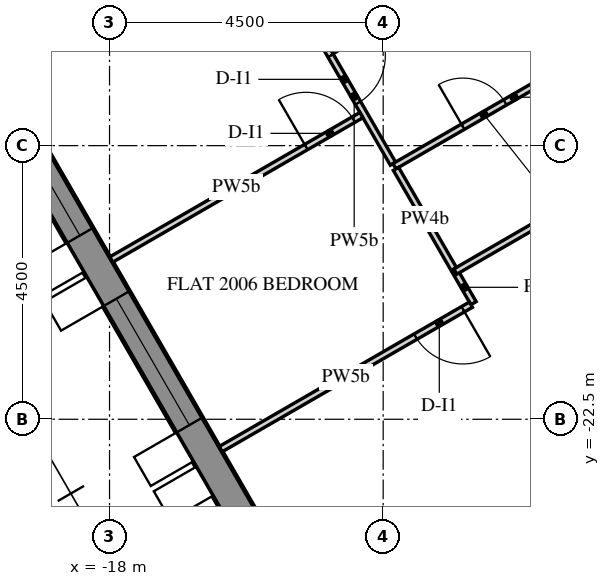
"""IFC4 building model, lengths in metres.
Left out: names, types, materials, properties, quantities, classifications, styles, units other than length and angle.
Written with IfcOpenShell. Run it as: python <this file> out.ifc"""

import sys

from ifc_helpers import new_model, si_unit, direction, frame, frame_2d, origin, place, context, subcontext, project, spatial, polyline, rectangle, outline, extrude, element, fill, save


model = new_model("IFC4")
c1 = context("Model", 3, precision=1e-05, world=origin(), true_north=direction((0.0, 1.0)))
c2 = subcontext(c1, "Body", "Model", "MODEL_VIEW")
j1 = project(units=[si_unit("LENGTHUNIT", "METRE"), si_unit("PLANEANGLEUNIT", "RADIAN")], contexts=[c1])
p1 = place(None, origin())
s1 = spatial("IfcSite", under=j1, at=p1, CompositionType="ELEMENT")
p2 = place(p1, origin())
s2 = spatial("IfcBuilding", under=s1, at=p2, CompositionType="ELEMENT")
p3 = place(p2, frame((0.0, 0.0, 256.2)))
s3 = spatial("IfcBuildingStorey", under=s2, at=p3, CompositionType="ELEMENT", Elevation=256.2)
p4 = place(p3, frame((-28.149, -2.745, 0.0), z_axis=(0.0, 0.0, 1.0), x_axis=(0.500003737743, -0.866023245787, 0.0)))
e1 = element("IfcWall", 1, at=p4, inside=s3, PredefinedType="SOLIDWALL", context=c2, shape_type="SweptSolid", body=[
    extrude(outline(polyline([(-0.021, -0.25), (25.468, -0.25), (25.421, 0.25), (0.021, 0.25), (-0.021, -0.25)])), origin(), (0.0, 0.0, 1.0), 3.75),
])
p5 = place(p4, frame((2.522, 0.0, 0.6)))
e2 = element("IfcOpeningElement", 2, at=p5, cuts=e1, PredefinedType="OPENING", context=c2, shape_type="SweptSolid", body=[
    extrude(rectangle(XDim=2.4, YDim=2.7, at=frame_2d((1.2, 1.35))), frame((0.0, 0.26, 0.0), z_axis=(0.0, -1.0, 0.0), x_axis=(1.0, 0.0, 0.0)), (0.0, 0.0, 1.0), 0.52),
])
p6 = place(p4, frame((6.122, 0.0, 0.6)))
e3 = element("IfcOpeningElement", 3, at=p6, cuts=e1, PredefinedType="OPENING", context=c2, shape_type="SweptSolid", body=[
    extrude(rectangle(XDim=2.4, YDim=2.7, at=frame_2d((1.2, 1.35))), frame((0.0, 0.26, 0.0), z_axis=(0.0, -1.0, 0.0), x_axis=(1.0, 0.0, 0.0)), (0.0, 0.0, 1.0), 0.52),
])
p7 = place(p4, frame((9.722, 0.0, 0.6)))
e4 = element("IfcOpeningElement", 4, at=p7, cuts=e1, PredefinedType="OPENING", context=c2, shape_type="SweptSolid", body=[
    extrude(rectangle(XDim=2.4, YDim=2.7, at=frame_2d((1.2, 1.35))), frame((0.0, 0.26, 0.0), z_axis=(0.0, -1.0, 0.0), x_axis=(1.0, 0.0, 0.0)), (0.0, 0.0, 1.0), 0.52),
])
p8 = place(p4, frame((13.323, 0.0, 0.6)))
e5 = element("IfcOpeningElement", 5, at=p8, cuts=e1, PredefinedType="OPENING", context=c2, shape_type="SweptSolid", body=[
    extrude(rectangle(XDim=2.4, YDim=2.7, at=frame_2d((1.2, 1.35))), frame((0.0, 0.26, 0.0), z_axis=(0.0, -1.0, 0.0), x_axis=(1.0, 0.0, 0.0)), (0.0, 0.0, 1.0), 0.52),
])
p9 = place(p4, frame((16.922, 0.0, 0.6)))
e6 = element("IfcOpeningElement", 6, at=p9, cuts=e1, PredefinedType="OPENING", context=c2, shape_type="SweptSolid", body=[
    extrude(rectangle(XDim=2.4, YDim=2.7, at=frame_2d((1.2, 1.35))), frame((0.0, 0.26, 0.0), z_axis=(0.0, -1.0, 0.0), x_axis=(1.0, 0.0, 0.0)), (0.0, 0.0, 1.0), 0.52),
])
p10 = place(p4, frame((20.522, 0.0, 0.6)))
e7 = element("IfcOpeningElement", 7, at=p10, cuts=e1, PredefinedType="OPENING", context=c2, shape_type="SweptSolid", body=[
    extrude(rectangle(XDim=2.4, YDim=2.7, at=frame_2d((1.2, 1.35))), frame((0.0, 0.26, 0.0), z_axis=(0.0, -1.0, 0.0), x_axis=(1.0, 0.0, 0.0)), (0.0, 0.0, 1.0), 0.52),
])
p11 = place(p3, frame((-10.86, -24.567, 0.0), z_axis=(0.0, 0.0, 1.0), x_axis=(0.997564329317, 0.06975248292, 0.0)))
e8 = element("IfcWall", 8, at=p11, inside=s3, PredefinedType="SOLIDWALL", context=c2, shape_type="SweptSolid", body=[
    extrude(outline(polyline([(0.25, -0.25), (22.795, -0.25), (23.295, 0.25), (-0.25, 0.25), (0.25, -0.25)])), origin(), (0.0, 0.0, 1.0), 3.75),
])
p12 = place(p11, frame((1.323, 0.0, 0.9)))
e9 = element("IfcOpeningElement", 9, at=p12, cuts=e8, PredefinedType="OPENING", context=c2, shape_type="SweptSolid", body=[
    extrude(rectangle(XDim=0.9, YDim=1.5, at=frame_2d((0.45, 0.75))), frame((0.0, 0.26, 0.0), z_axis=(0.0, -1.0, 0.0), x_axis=(1.0, 0.0, 0.0)), (0.0, 0.0, 1.0), 0.52),
])
p13 = place(p11, frame((2.522, 0.0, 0.0)))
e10 = element("IfcOpeningElement", 10, at=p13, cuts=e8, PredefinedType="OPENING", context=c2, shape_type="SweptSolid", body=[
    extrude(rectangle(XDim=1.2, YDim=2.4, at=frame_2d((0.6, 1.2))), frame((0.0, 0.26, 0.0), z_axis=(0.0, -1.0, 0.0), x_axis=(1.0, 0.0, 0.0)), (0.0, 0.0, 1.0), 0.52),
])
p14 = place(p11, frame((4.922, 0.0, 0.9)))
e11 = element("IfcOpeningElement", 11, at=p14, cuts=e8, PredefinedType="OPENING", context=c2, shape_type="SweptSolid", body=[
    extrude(rectangle(XDim=0.9, YDim=1.5, at=frame_2d((0.45, 0.75))), frame((0.0, 0.26, 0.0), z_axis=(0.0, -1.0, 0.0), x_axis=(1.0, 0.0, 0.0)), (0.0, 0.0, 1.0), 0.52),
])
p15 = place(p11, frame((6.122, 0.0, 0.0)))
e12 = element("IfcOpeningElement", 12, at=p15, cuts=e8, PredefinedType="OPENING", context=c2, shape_type="SweptSolid", body=[
    extrude(rectangle(XDim=1.2, YDim=2.4, at=frame_2d((0.6, 1.2))), frame((0.0, 0.26, 0.0), z_axis=(0.0, -1.0, 0.0), x_axis=(1.0, 0.0, 0.0)), (0.0, 0.0, 1.0), 0.52),
])
p16 = place(p11, frame((8.522, 0.0, 0.9)))
e13 = element("IfcOpeningElement", 13, at=p16, cuts=e8, PredefinedType="OPENING", context=c2, shape_type="SweptSolid", body=[
    extrude(rectangle(XDim=0.9, YDim=1.5, at=frame_2d((0.45, 0.75))), frame((0.0, 0.26, 0.0), z_axis=(0.0, -1.0, 0.0), x_axis=(1.0, 0.0, 0.0)), (0.0, 0.0, 1.0), 0.52),
])
p17 = place(p11, frame((9.722, 0.0, 0.0)))
e14 = element("IfcOpeningElement", 14, at=p17, cuts=e8, PredefinedType="OPENING", context=c2, shape_type="SweptSolid", body=[
    extrude(rectangle(XDim=1.2, YDim=2.4, at=frame_2d((0.6, 1.2))), frame((0.0, 0.26, 0.0), z_axis=(0.0, -1.0, 0.0), x_axis=(1.0, 0.0, 0.0)), (0.0, 0.0, 1.0), 0.52),
])
p18 = place(p11, frame((12.122, 0.0, 0.9)))
e15 = element("IfcOpeningElement", 15, at=p18, cuts=e8, PredefinedType="OPENING", context=c2, shape_type="SweptSolid", body=[
    extrude(rectangle(XDim=0.9, YDim=1.5, at=frame_2d((0.45, 0.75))), frame((0.0, 0.26, 0.0), z_axis=(0.0, -1.0, 0.0), x_axis=(1.0, 0.0, 0.0)), (0.0, 0.0, 1.0), 0.52),
])
p19 = place(p11, frame((13.323, 0.0, 0.0)))
e16 = element("IfcOpeningElement", 16, at=p19, cuts=e8, PredefinedType="OPENING", context=c2, shape_type="SweptSolid", body=[
    extrude(rectangle(XDim=1.2, YDim=2.4, at=frame_2d((0.6, 1.2))), frame((0.0, 0.26, 0.0), z_axis=(0.0, -1.0, 0.0), x_axis=(1.0, 0.0, 0.0)), (0.0, 0.0, 1.0), 0.52),
])
p20 = place(p11, frame((15.722, 0.0, 0.9)))
e17 = element("IfcOpeningElement", 17, at=p20, cuts=e8, PredefinedType="OPENING", context=c2, shape_type="SweptSolid", body=[
    extrude(rectangle(XDim=0.9, YDim=1.5, at=frame_2d((0.45, 0.75))), frame((0.0, 0.26, 0.0), z_axis=(0.0, -1.0, 0.0), x_axis=(1.0, 0.0, 0.0)), (0.0, 0.0, 1.0), 0.52),
])
p21 = place(p11, frame((16.922, 0.0, 0.0)))
e18 = element("IfcOpeningElement", 18, at=p21, cuts=e8, PredefinedType="OPENING", context=c2, shape_type="SweptSolid", body=[
    extrude(rectangle(XDim=1.2, YDim=2.4, at=frame_2d((0.6, 1.2))), frame((0.0, 0.26, 0.0), z_axis=(0.0, -1.0, 0.0), x_axis=(1.0, 0.0, 0.0)), (0.0, 0.0, 1.0), 0.52),
])
p22 = place(p11, frame((19.323, 0.0, 0.9)))
e19 = element("IfcOpeningElement", 19, at=p22, cuts=e8, PredefinedType="OPENING", context=c2, shape_type="SweptSolid", body=[
    extrude(rectangle(XDim=0.9, YDim=1.5, at=frame_2d((0.45, 0.75))), frame((0.0, 0.26, 0.0), z_axis=(0.0, -1.0, 0.0), x_axis=(1.0, 0.0, 0.0)), (0.0, 0.0, 1.0), 0.52),
])
p23 = place(p11, frame((20.522, 0.0, 0.0)))
e20 = element("IfcOpeningElement", 20, at=p23, cuts=e8, PredefinedType="OPENING", context=c2, shape_type="SweptSolid", body=[
    extrude(rectangle(XDim=1.2, YDim=2.4, at=frame_2d((0.6, 1.2))), frame((0.0, 0.26, 0.0), z_axis=(0.0, -1.0, 0.0), x_axis=(1.0, 0.0, 0.0)), (0.0, 0.0, 1.0), 0.52),
])
p24 = place(p3, frame((-19.771, -16.755, 0.0), z_axis=(0.0, 0.0, 1.0), x_axis=(0.866022959057, 0.500004234368, 0.0)))
e21 = element("IfcWall", 21, at=p24, inside=s3, PredefinedType="PARTITIONING", context=c2, shape_type="SweptSolid", body=[
    extrude(rectangle(XDim=8.125, YDim=0.18, at=frame_2d((4.062, 0.0))), origin(), (0.0, 0.0, 1.0), 2.823),
])
p25 = place(p3, frame((-12.315, -20.069, 0.0), z_axis=(0.0, 0.0, 1.0), x_axis=(0.500108649621, -0.865962665808, 0.0)))
e22 = element("IfcWall", 22, at=p25, inside=s3, PredefinedType="PARTITIONING", context=c2, shape_type="SweptSolid", body=[
    extrude(rectangle(XDim=0.602, YDim=0.1, at=frame_2d((0.301, 0.0))), origin(), (0.0, 0.0, 1.0), 2.823),
])
p26 = place(p3, frame((-12.058, -20.615, 0.0), z_axis=(0.0, 0.0, 1.0), x_axis=(-0.866020389056, -0.500008685663, 0.0)))
e23 = element("IfcWall", 23, at=p26, inside=s3, PredefinedType="PARTITIONING", context=c2, shape_type="SweptSolid", body=[
    extrude(rectangle(XDim=4.75, YDim=0.1, at=frame_2d((2.375, 0.0))), origin(), (0.0, 0.0, 1.0), 2.823),
])
p27 = place(p26, frame((0.15, 0.0, 0.0)))
e24 = element("IfcOpeningElement", 24, at=p27, cuts=e23, PredefinedType="OPENING", context=c2, shape_type="SweptSolid", body=[
    extrude(rectangle(XDim=0.9, YDim=2.1, at=frame_2d((0.45, 1.05))), frame((0.0, 0.06, 0.0), z_axis=(0.0, -1.0, 0.0), x_axis=(1.0, 0.0, 0.0)), (0.0, 0.0, 1.0), 0.12),
])
p28 = place(p3, frame((-4.831, -15.75, 0.0), z_axis=(0.0, 0.0, 1.0), x_axis=(-0.866012441049, -0.500022451445, 0.0)))
e25 = element("IfcWall", 25, at=p28, inside=s3, PredefinedType="PARTITIONING", context=c2, shape_type="SweptSolid", body=[
    extrude(rectangle(XDim=8.641, YDim=0.1, at=frame_2d((4.321, 0.0))), origin(), (0.0, 0.0, 1.0), 2.823),
])
p29 = place(p3, frame((-14.615, -16.085, 0.0), z_axis=(0.0, 0.0, 1.0), x_axis=(0.499943114462, -0.866058244174, 0.0)))
e26 = element("IfcWall", 26, at=p29, inside=s3, PredefinedType="PARTITIONING", context=c2, shape_type="SweptSolid", body=[
    extrude(rectangle(XDim=2.554, YDim=0.1, at=frame_2d((1.277, 0.0))), origin(), (0.0, 0.0, 1.0), 2.823),
])
p30 = place(p29, frame((0.502, 0.0, 0.0)))
e27 = element("IfcOpeningElement", 27, at=p30, cuts=e26, PredefinedType="OPENING", context=c2, shape_type="SweptSolid", body=[
    extrude(rectangle(XDim=0.9, YDim=2.1, at=frame_2d((0.45, 1.05))), frame((0.0, 0.06, 0.0), z_axis=(0.0, -1.0, 0.0), x_axis=(1.0, 0.0, 0.0)), (0.0, 0.0, 1.0), 0.12),
])
p31 = place(p3, frame((-13.314, -18.339, 0.0), z_axis=(0.0, 0.0, 1.0), x_axis=(0.866020827114, 0.500007926942, 0.0)))
e28 = element("IfcWall", 28, at=p31, inside=s3, PredefinedType="PARTITIONING", context=c2, shape_type="SweptSolid", body=[
    extrude(rectangle(XDim=4.541, YDim=0.1, at=frame_2d((2.27, 0.0))), origin(), (0.0, 0.0, 1.0), 2.823),
])
p32 = place(p31, frame((1.3, 0.0, 0.0)))
e29 = element("IfcOpeningElement", 29, at=p32, cuts=e28, PredefinedType="OPENING", context=c2, shape_type="SweptSolid", body=[
    extrude(rectangle(XDim=0.8, YDim=2.1, at=frame_2d((0.4, 1.05))), frame((0.0, 0.06, 0.0), z_axis=(0.0, -1.0, 0.0), x_axis=(1.0, 0.0, 0.0)), (0.0, 0.0, 1.0), 0.12),
])
p33 = place(p3, frame((-17.971, -19.873, 0.0), z_axis=(0.0, 0.0, 1.0), x_axis=(0.866020389056, 0.500008685663, 0.0)))
e30 = element("IfcWall", 30, at=p33, inside=s3, PredefinedType="PARTITIONING", context=c2, shape_type="SweptSolid", body=[
    extrude(rectangle(XDim=4.75, YDim=0.1, at=frame_2d((2.375, 0.0))), origin(), (0.0, 0.0, 1.0), 2.823),
])
p34 = place(p33, frame((3.7, 0.0, 0.0)))
e31 = element("IfcOpeningElement", 31, at=p34, cuts=e30, PredefinedType="OPENING", context=c2, shape_type="SweptSolid", body=[
    extrude(rectangle(XDim=0.9, YDim=2.1, at=frame_2d((0.45, 1.05))), frame((0.0, 0.06, 0.0), z_axis=(0.0, -1.0, 0.0), x_axis=(1.0, 0.0, 0.0)), (0.0, 0.0, 1.0), 0.12),
])
p35 = place(p3, frame((-12.339, -20.028, 0.0), z_axis=(0.0, 0.0, 1.0), x_axis=(-0.500022797313, 0.86601224135, 0.0)))
e32 = element("IfcWall", 32, at=p35, inside=s3, PredefinedType="PARTITIONING", context=c2, shape_type="SweptSolid", body=[
    extrude(rectangle(XDim=1.9, YDim=0.1, at=frame_2d((0.95, 0.0))), origin(), (0.0, 0.0, 1.0), 2.823),
])
p36 = place(p9, frame((0.0, 0.18, 0.0)))
e33 = element("IfcWindow", 33, at=p36, inside=s3, PartitioningType="DOUBLE_PANEL_VERTICAL", PredefinedType="WINDOW", context=c2, shape_type="SweptSolid", body=[
    extrude(rectangle(XDim=2.4, YDim=2.7, at=frame_2d((1.2, 1.35))), frame((0.0, 0.03, 0.0), z_axis=(0.0, -1.0, 0.0), x_axis=(1.0, 0.0, 0.0)), (0.0, 0.0, 1.0), 0.06),
])
fill(e6, e33)
p37 = place(p10, frame((0.0, 0.18, 0.0)))
e34 = element("IfcWindow", 34, at=p37, inside=s3, PartitioningType="DOUBLE_PANEL_VERTICAL", PredefinedType="WINDOW", context=c2, shape_type="SweptSolid", body=[
    extrude(rectangle(XDim=2.4, YDim=2.7, at=frame_2d((1.2, 1.35))), frame((0.0, 0.03, 0.0), z_axis=(0.0, -1.0, 0.0), x_axis=(1.0, 0.0, 0.0)), (0.0, 0.0, 1.0), 0.06),
])
fill(e7, e34)
p38 = place(p30, origin())
e35 = element("IfcDoor", 35, at=p38, inside=s3, OperationType="SINGLE_SWING_LEFT", PredefinedType="DOOR", context=c2, shape_type="SweptSolid", body=[
    extrude(rectangle(XDim=0.9, YDim=2.1, at=frame_2d((0.45, 1.05))), frame((0.0, 0.025, 0.0), z_axis=(0.0, -1.0, 0.0), x_axis=(1.0, 0.0, 0.0)), (0.0, 0.0, 1.0), 0.05),
])
fill(e27, e35)
p39 = place(p34, origin())
e36 = element("IfcDoor", 36, at=p39, inside=s3, OperationType="SINGLE_SWING_RIGHT", PredefinedType="DOOR", context=c2, shape_type="SweptSolid", body=[
    extrude(rectangle(XDim=0.9, YDim=2.1, at=frame_2d((0.45, 1.05))), frame((0.0, 0.025, 0.0), z_axis=(0.0, -1.0, 0.0), x_axis=(1.0, 0.0, 0.0)), (0.0, 0.0, 1.0), 0.05),
])
fill(e31, e36)
p40 = place(p27, origin())
e37 = element("IfcDoor", 37, at=p40, inside=s3, OperationType="SINGLE_SWING_RIGHT", PredefinedType="DOOR", context=c2, shape_type="SweptSolid", body=[
    extrude(rectangle(XDim=0.9, YDim=2.1, at=frame_2d((0.45, 1.05))), frame((0.0, 0.025, 0.0), z_axis=(0.0, -1.0, 0.0), x_axis=(1.0, 0.0, 0.0)), (0.0, 0.0, 1.0), 0.05),
])
fill(e24, e37)
p41 = place(p32, origin())
e38 = element("IfcDoor", 38, at=p41, inside=s3, OperationType="SINGLE_SWING_RIGHT", PredefinedType="DOOR", context=c2, shape_type="SweptSolid", body=[
    extrude(rectangle(XDim=0.8, YDim=2.1, at=frame_2d((0.4, 1.05))), frame((0.0, 0.025, 0.0), z_axis=(0.0, -1.0, 0.0), x_axis=(1.0, 0.0, 0.0)), (0.0, 0.0, 1.0), 0.05),
])
fill(e29, e38)
save(model, sys.argv[1])
